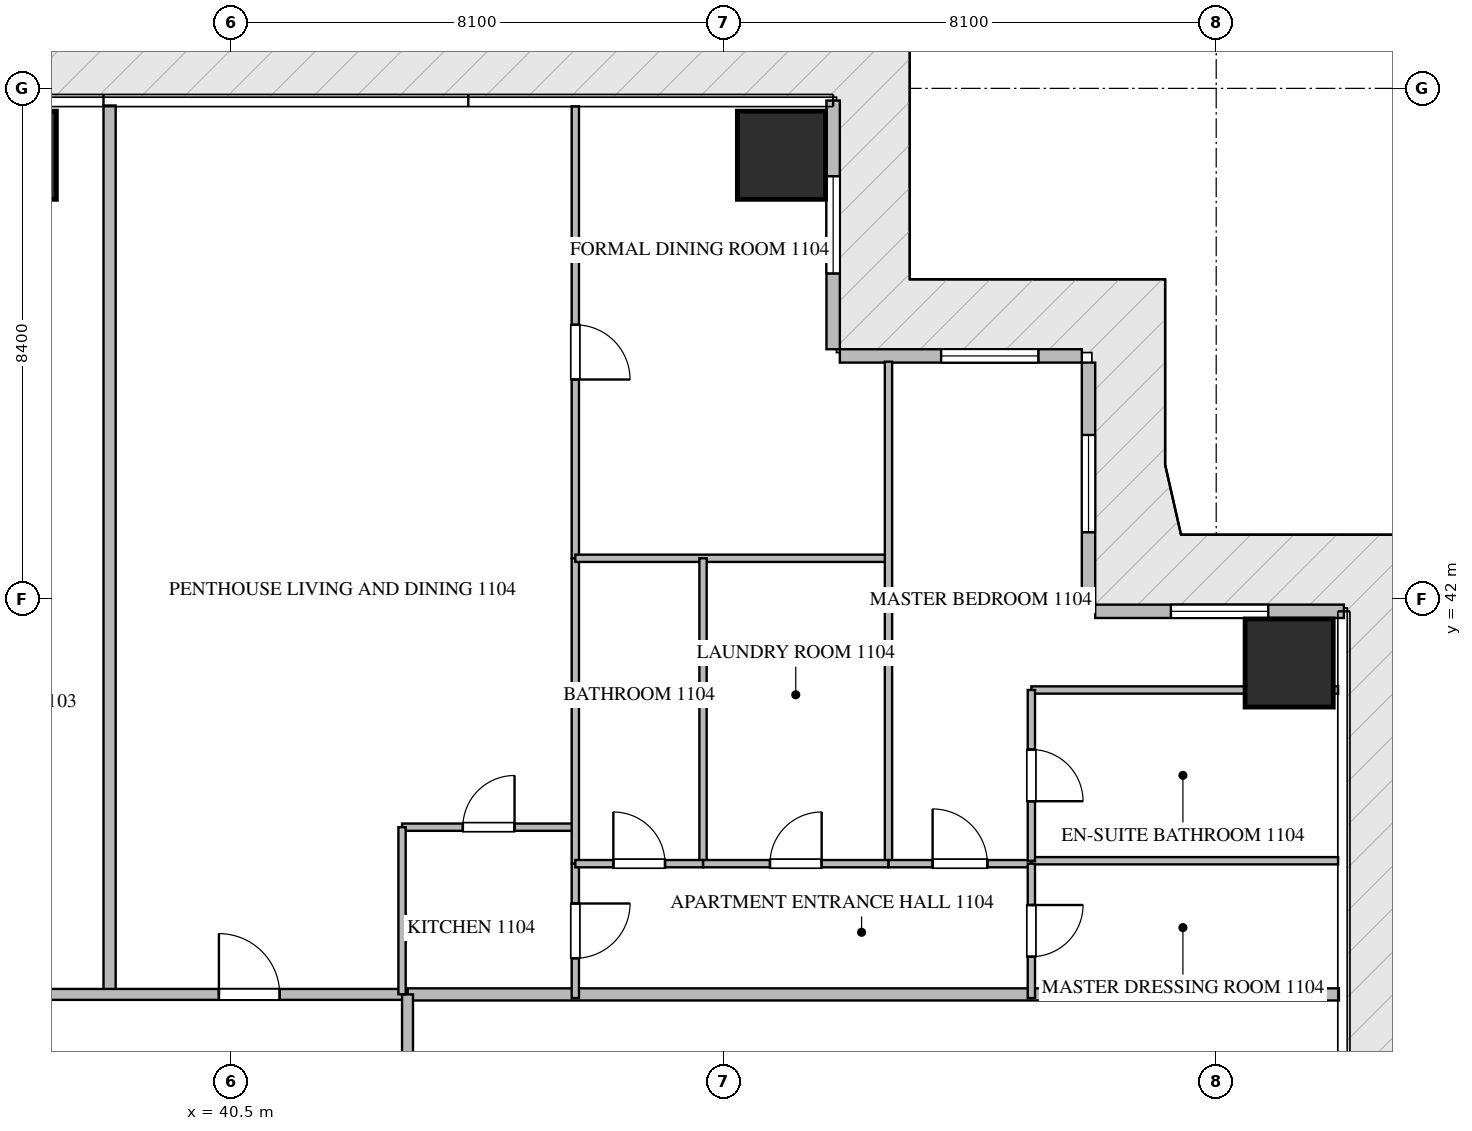
"""IFC4 building model, lengths in metres.
Left out: names, types, materials, properties, quantities, classifications, styles, units other than length and angle.
Written with IfcOpenShell. Run it as: python <this file> out.ifc"""

import sys

from ifc_helpers import new_model, si_unit, direction, frame, frame_2d, origin, origin_2d, place, context, subcontext, project, spatial, rectangle, extrude, source, transform, mapped, element, fill, save


model = new_model("IFC4")
c1 = context("Model", 3, precision=1e-05, world=origin(), true_north=direction((0.0, 1.0)))
c2 = subcontext(c1, "Body", "Model", "MODEL_VIEW")
j1 = project(units=[si_unit("LENGTHUNIT", "METRE"), si_unit("PLANEANGLEUNIT", "RADIAN")], contexts=[c1])
p1 = place(None, origin())
s1 = spatial("IfcSite", under=j1, at=p1, CompositionType="ELEMENT")
p2 = place(p1, origin())
s2 = spatial("IfcBuilding", under=s1, at=p2, CompositionType="ELEMENT")
p3 = place(p2, frame((0.0, 0.0, 49.2)))
s3 = spatial("IfcBuildingStorey", under=s2, at=p3, CompositionType="ELEMENT", Elevation=49.2)
m1 = source(origin(), c2, "Body", "SweptSolid", [
    extrude(rectangle(XDim=1.45, YDim=1.45, at=origin_2d()), origin(), (0.0, 0.0, 1.0), 3.75),
])
for number, where, z_axis, x_axis in (
    (1, (36.9, 49.3, -0.26), (0.0, 0.0, 1.0), (1.0, 0.0, 0.0)),
    (2, (49.55, 49.3, -0.26), (0.0, 0.0, 1.0), (1.0, 0.0, 0.0)),
    (3, (57.9, 40.95, -0.26), (0.0, 0.0, 1.0), (1.0, 0.0, 0.0)),
):
    element("IfcColumn", number, at=place(p3, frame(where, z_axis=z_axis, x_axis=x_axis)), inside=s3, PredefinedType="COLUMN", context=c2, shape_type="MappedRepresentation", body=[
        mapped(m1, transform((0.0, 0.0, 0.0), scale=1.0)),
    ])
p4 = place(p3, frame((58.8, 41.8, 0.0), z_axis=(0.0, 0.0, 1.0), x_axis=(-1.0, 0.0, 0.0)))
e4 = element("IfcWall", 4, at=p4, inside=s3, PredefinedType="ELEMENTEDWALL", context=c2, shape_type="SweptSolid", body=[
    extrude(rectangle(XDim=4.09, YDim=0.22, at=frame_2d((2.045, 0.0))), origin(), (0.0, 0.0, 1.0), 3.475),
])
p5 = place(p4, frame((1.245, 0.0, 0.65)))
e5 = element("IfcOpeningElement", 5, at=p5, cuts=e4, PredefinedType="OPENING", context=c2, shape_type="SweptSolid", body=[
    extrude(rectangle(XDim=1.6, YDim=2.1, at=frame_2d((0.8, 1.05))), frame((0.0, 0.12, 0.0), z_axis=(0.0, -1.0, 0.0), x_axis=(1.0, 0.0, 0.0)), (0.0, 0.0, 1.0), 0.24),
])
p6 = place(p3, frame((54.6, 41.91, 0.0), z_axis=(0.0, 0.0, 1.0), x_axis=(0.0, 1.0, 0.0)))
e6 = element("IfcWall", 6, at=p6, inside=s3, PredefinedType="ELEMENTEDWALL", context=c2, shape_type="SweptSolid", body=[
    extrude(rectangle(XDim=3.98, YDim=0.22, at=frame_2d((1.99, 0.0))), origin(), (0.0, 0.0, 1.0), 3.475),
])
p7 = place(p6, frame((1.19, 0.0, 0.65)))
e7 = element("IfcOpeningElement", 7, at=p7, cuts=e6, PredefinedType="OPENING", context=c2, shape_type="SweptSolid", body=[
    extrude(rectangle(XDim=1.6, YDim=2.1, at=frame_2d((0.8, 1.05))), frame((0.0, 0.12, 0.0), z_axis=(0.0, -1.0, 0.0), x_axis=(1.0, 0.0, 0.0)), (0.0, 0.0, 1.0), 0.24),
])
p8 = place(p3, frame((54.49, 46.0, 0.0), z_axis=(0.0, 0.0, 1.0), x_axis=(-1.0, 0.0, 0.0)))
e8 = element("IfcWall", 8, at=p8, inside=s3, PredefinedType="ELEMENTEDWALL", context=c2, shape_type="SweptSolid", body=[
    extrude(rectangle(XDim=3.98, YDim=0.22, at=frame_2d((1.99, 0.0))), origin(), (0.0, 0.0, 1.0), 3.475),
])
p9 = place(p8, frame((0.714, 0.0, 0.65)))
e9 = element("IfcOpeningElement", 9, at=p9, cuts=e8, PredefinedType="OPENING", context=c2, shape_type="SweptSolid", body=[
    extrude(rectangle(XDim=1.6, YDim=2.1, at=frame_2d((0.8, 1.05))), frame((0.0, 0.12, 0.0), z_axis=(0.0, -1.0, 0.0), x_axis=(1.0, 0.0, 0.0)), (0.0, 0.0, 1.0), 0.24),
])
p10 = place(p3, frame((50.4, 46.11, 0.0), z_axis=(0.0, 0.0, 1.0), x_axis=(0.0, 1.0, 0.0)))
e10 = element("IfcWall", 10, at=p10, inside=s3, PredefinedType="ELEMENTEDWALL", context=c2, shape_type="SweptSolid", body=[
    extrude(rectangle(XDim=4.09, YDim=0.22, at=frame_2d((2.045, 0.0))), origin(), (0.0, 0.0, 1.0), 3.475),
])
p11 = place(p10, frame((1.245, 0.0, 0.65)))
e11 = element("IfcOpeningElement", 11, at=p11, cuts=e10, PredefinedType="OPENING", context=c2, shape_type="SweptSolid", body=[
    extrude(rectangle(XDim=1.6, YDim=2.1, at=frame_2d((0.8, 1.05))), frame((0.0, 0.12, 0.0), z_axis=(0.0, -1.0, 0.0), x_axis=(1.0, 0.0, 0.0)), (0.0, 0.0, 1.0), 0.24),
])
p12 = place(p3, frame((38.5, 35.5, 0.0), z_axis=(0.0, 0.0, 1.0), x_axis=(0.0, 1.0, 0.0)))
e12 = element("IfcWall", 12, at=p12, inside=s3, PredefinedType="PARTITIONING", context=c2, shape_type="SweptSolid", body=[
    extrude(rectangle(XDim=14.618, YDim=0.2, at=frame_2d((7.309, 0.0))), origin(), (0.0, 0.0, 1.0), 3.49),
])
p13 = place(p3, frame((43.4, 35.5, 0.0), z_axis=(0.0, 0.0, 1.0), x_axis=(1.0, 0.0, 0.0)))
e13 = element("IfcWall", 13, at=p13, inside=s3, PredefinedType="PARTITIONING", context=c2, shape_type="SweptSolid", body=[
    extrude(rectangle(XDim=15.318, YDim=0.2, at=frame_2d((7.659, 0.0))), origin(), (0.0, 0.0, 1.0), 3.49),
])
p14 = place(p3, frame((21.402, 35.5, 0.0), z_axis=(0.0, 0.0, 1.0), x_axis=(1.0, 0.0, 0.0)))
e14 = element("IfcWall", 14, at=p14, inside=s3, PredefinedType="PARTITIONING", context=c2, shape_type="SweptSolid", body=[
    extrude(rectangle(XDim=21.996, YDim=0.18, at=frame_2d((10.998, 0.0))), origin(), (0.0, 0.0, 1.0), 3.49),
])
p15 = place(p14, frame((2.1, 0.0, 0.0)))
e15 = element("IfcOpeningElement", 15, at=p15, cuts=e14, PredefinedType="OPENING", context=c2, shape_type="SweptSolid", body=[
    extrude(rectangle(XDim=1.0, YDim=2.15, at=frame_2d((0.5, 1.075))), frame((0.0, 0.1, 0.0), z_axis=(0.0, -1.0, 0.0), x_axis=(1.0, 0.0, 0.0)), (0.0, 0.0, 1.0), 0.2),
])
p16 = place(p14, frame((14.214, 0.0, 0.0)))
e16 = element("IfcOpeningElement", 16, at=p16, cuts=e14, PredefinedType="OPENING", context=c2, shape_type="SweptSolid", body=[
    extrude(rectangle(XDim=1.0, YDim=2.15, at=frame_2d((0.5, 1.075))), frame((0.0, 0.1, 0.0), z_axis=(0.0, -1.0, 0.0), x_axis=(1.0, 0.0, 0.0)), (0.0, 0.0, 1.0), 0.2),
])
p17 = place(p14, frame((18.896, 0.0, 0.0)))
e17 = element("IfcOpeningElement", 17, at=p17, cuts=e14, PredefinedType="OPENING", context=c2, shape_type="SweptSolid", body=[
    extrude(rectangle(XDim=1.0, YDim=2.15, at=frame_2d((0.5, 1.075))), frame((0.0, 0.1, 0.0), z_axis=(0.0, -1.0, 0.0), x_axis=(1.0, 0.0, 0.0)), (0.0, 0.0, 1.0), 0.2),
])
p18 = place(p3, frame((43.4, 14.9, 0.0), z_axis=(0.0, 0.0, 1.0), x_axis=(0.0, 1.0, 0.0)))
e18 = element("IfcWall", 18, at=p18, inside=s3, PredefinedType="PARTITIONING", context=c2, shape_type="SweptSolid", body=[
    extrude(rectangle(XDim=20.6, YDim=0.18, at=frame_2d((10.3, 0.0))), origin(), (0.0, 0.0, 1.0), 3.49),
])
p19 = place(p18, frame((17.64, 0.0, 0.0)))
e19 = element("IfcOpeningElement", 19, at=p19, cuts=e18, PredefinedType="OPENING", context=c2, shape_type="SweptSolid", body=[
    extrude(rectangle(XDim=1.0, YDim=2.15, at=frame_2d((0.5, 1.075))), frame((0.0, 0.1, 0.0), z_axis=(0.0, -1.0, 0.0), x_axis=(1.0, 0.0, 0.0)), (0.0, 0.0, 1.0), 0.2),
])
p20 = place(p3, frame((43.31, 38.25, 0.0), z_axis=(0.0, 0.0, 1.0), x_axis=(1.0, 0.0, 0.0)))
e20 = element("IfcWall", 20, at=p20, inside=s3, PredefinedType="PARTITIONING", context=c2, shape_type="SweptSolid", body=[
    extrude(rectangle(XDim=2.85, YDim=0.12, at=frame_2d((1.425, 0.0))), origin(), (0.0, 0.0, 1.0), 3.49),
])
p21 = place(p20, frame((1.0, 0.0, 0.0)))
e21 = element("IfcOpeningElement", 21, at=p21, cuts=e20, PredefinedType="OPENING", context=c2, shape_type="SweptSolid", body=[
    extrude(rectangle(XDim=0.85, YDim=2.1, at=frame_2d((0.425, 1.05))), frame((0.0, 0.07, 0.0), z_axis=(0.0, -1.0, 0.0), x_axis=(1.0, 0.0, 0.0)), (0.0, 0.0, 1.0), 0.14),
])
p22 = place(p3, frame((43.31, 38.25, 0.0), z_axis=(0.0, 0.0, 1.0), x_axis=(0.0, -1.0, 0.0)))
e22 = element("IfcWall", 22, at=p22, inside=s3, PredefinedType="PARTITIONING", context=c2, shape_type="SweptSolid", body=[
    extrude(rectangle(XDim=2.748, YDim=0.12, at=frame_2d((1.374, 0.0))), origin(), (0.0, 0.0, 1.0), 3.49),
])
p23 = place(p3, frame((46.16, 37.65, 0.0), z_axis=(0.0, 0.0, 1.0), x_axis=(0.0, -1.0, 0.0)))
e23 = element("IfcWall", 23, at=p23, inside=s3, PredefinedType="PARTITIONING", context=c2, shape_type="SweptSolid", body=[
    extrude(rectangle(XDim=2.21, YDim=0.12, at=frame_2d((1.105, 0.0))), origin(), (0.0, 0.0, 1.0), 3.49),
])
p24 = place(p23, frame((0.655, 0.0, 0.0)))
e24 = element("IfcOpeningElement", 24, at=p24, cuts=e23, PredefinedType="OPENING", context=c2, shape_type="SweptSolid", body=[
    extrude(rectangle(XDim=0.9, YDim=2.1, at=frame_2d((0.45, 1.05))), frame((0.0, 0.07, 0.0), z_axis=(0.0, -1.0, 0.0), x_axis=(1.0, 0.0, 0.0)), (0.0, 0.0, 1.0), 0.14),
])
p25 = place(p3, frame((46.16, 50.105, 0.0), z_axis=(0.0, 0.0, 1.0), x_axis=(0.0, -1.0, 0.0)))
e25 = element("IfcWall", 25, at=p25, inside=s3, PredefinedType="PARTITIONING", context=c2, shape_type="SweptSolid", body=[
    extrude(rectangle(XDim=7.433, YDim=0.12, at=frame_2d((3.716, 0.0))), origin(), (0.0, 0.0, 1.0), 3.49),
])
p26 = place(p25, frame((3.593, 0.0, 0.0)))
e26 = element("IfcOpeningElement", 26, at=p26, cuts=e25, PredefinedType="OPENING", context=c2, shape_type="SweptSolid", body=[
    extrude(rectangle(XDim=0.9, YDim=2.1, at=frame_2d((0.45, 1.05))), frame((0.0, 0.07, 0.0), z_axis=(0.0, -1.0, 0.0), x_axis=(1.0, 0.0, 0.0)), (0.0, 0.0, 1.0), 0.14),
])
p27 = place(p3, frame((46.16, 42.67, 0.0), z_axis=(0.0, 0.0, 1.0), x_axis=(0.0, -1.0, 0.0)))
e27 = element("IfcWall", 27, at=p27, inside=s3, PredefinedType="PARTITIONING", context=c2, shape_type="SweptSolid", body=[
    extrude(rectangle(XDim=5.018, YDim=0.12, at=frame_2d((2.509, 0.0))), origin(), (0.0, 0.0, 1.0), 3.49),
])
p28 = place(p3, frame((46.16, 42.672, 0.0), z_axis=(0.0, 0.0, 1.0), x_axis=(1.0, 0.0, 0.0)))
e28 = element("IfcWall", 28, at=p28, inside=s3, PredefinedType="PARTITIONING", context=c2, shape_type="SweptSolid", body=[
    extrude(rectangle(XDim=5.15, YDim=0.12, at=frame_2d((2.575, 0.0))), origin(), (0.0, 0.0, 1.0), 3.49),
])
p29 = place(p3, frame((51.31, 45.905, 0.0), z_axis=(0.0, 0.0, 1.0), x_axis=(0.0, -1.0, 0.0)))
e29 = element("IfcWall", 29, at=p29, inside=s3, PredefinedType="PARTITIONING", context=c2, shape_type="SweptSolid", body=[
    extrude(rectangle(XDim=8.255, YDim=0.12, at=frame_2d((4.127, 0.0))), origin(), (0.0, 0.0, 1.0), 3.49),
])
p30 = place(p3, frame((48.26, 42.672, 0.0), z_axis=(0.0, 0.0, 1.0), x_axis=(0.0, -1.0, 0.0)))
e30 = element("IfcWall", 30, at=p30, inside=s3, PredefinedType="PARTITIONING", context=c2, shape_type="SweptSolid", body=[
    extrude(rectangle(XDim=5.022, YDim=0.12, at=frame_2d((2.511, 0.0))), origin(), (0.0, 0.0, 1.0), 3.49),
])
p31 = place(p3, frame((46.16, 37.65, 0.0), z_axis=(0.0, 0.0, 1.0), x_axis=(1.0, 0.0, 0.0)))
e31 = element("IfcWall", 31, at=p31, inside=s3, PredefinedType="PARTITIONING", context=c2, shape_type="SweptSolid", body=[
    extrude(rectangle(XDim=2.1, YDim=0.12, at=frame_2d((1.05, 0.0))), origin(), (0.0, 0.0, 1.0), 3.49),
])
p32 = place(p31, frame((0.625, 0.0, 0.0)))
e32 = element("IfcOpeningElement", 32, at=p32, cuts=e31, PredefinedType="OPENING", context=c2, shape_type="SweptSolid", body=[
    extrude(rectangle(XDim=0.85, YDim=2.1, at=frame_2d((0.425, 1.05))), frame((0.0, 0.07, 0.0), z_axis=(0.0, -1.0, 0.0), x_axis=(1.0, 0.0, 0.0)), (0.0, 0.0, 1.0), 0.14),
])
p33 = place(p3, frame((48.262, 37.65, 0.0), z_axis=(0.0, 0.0, 1.0), x_axis=(1.0, 0.0, 0.0)))
e33 = element("IfcWall", 33, at=p33, inside=s3, PredefinedType="PARTITIONING", context=c2, shape_type="SweptSolid", body=[
    extrude(rectangle(XDim=3.048, YDim=0.12, at=frame_2d((1.524, 0.0))), origin(), (0.0, 0.0, 1.0), 3.49),
])
p34 = place(p33, frame((1.099, 0.0, 0.0)))
e34 = element("IfcOpeningElement", 34, at=p34, cuts=e33, PredefinedType="OPENING", context=c2, shape_type="SweptSolid", body=[
    extrude(rectangle(XDim=0.85, YDim=2.1, at=frame_2d((0.425, 1.05))), frame((0.0, 0.07, 0.0), z_axis=(0.0, -1.0, 0.0), x_axis=(1.0, 0.0, 0.0)), (0.0, 0.0, 1.0), 0.14),
])
p35 = place(p3, frame((51.312, 37.65, 0.0), z_axis=(0.0, 0.0, 1.0), x_axis=(1.0, 0.0, 0.0)))
e35 = element("IfcWall", 35, at=p35, inside=s3, PredefinedType="PARTITIONING", context=c2, shape_type="SweptSolid", body=[
    extrude(rectangle(XDim=2.348, YDim=0.12, at=frame_2d((1.174, 0.0))), origin(), (0.0, 0.0, 1.0), 3.49),
])
p36 = place(p35, frame((0.724, 0.0, 0.0)))
e36 = element("IfcOpeningElement", 36, at=p36, cuts=e35, PredefinedType="OPENING", context=c2, shape_type="SweptSolid", body=[
    extrude(rectangle(XDim=0.9, YDim=2.1, at=frame_2d((0.45, 1.05))), frame((0.0, 0.07, 0.0), z_axis=(0.0, -1.0, 0.0), x_axis=(1.0, 0.0, 0.0)), (0.0, 0.0, 1.0), 0.14),
])
p37 = place(p3, frame((53.66, 40.506, 0.0), z_axis=(0.0, 0.0, 1.0), x_axis=(1.0, 0.0, 0.0)))
e37 = element("IfcWall", 37, at=p37, inside=s3, PredefinedType="PARTITIONING", context=c2, shape_type="SweptSolid", body=[
    extrude(rectangle(XDim=5.045, YDim=0.12, at=frame_2d((2.522, 0.0))), origin(), (0.0, 0.0, 1.0), 3.49),
])
p38 = place(p3, frame((53.662, 37.698, 0.0), z_axis=(0.0, 0.0, 1.0), x_axis=(1.0, 0.0, 0.0)))
e38 = element("IfcWall", 38, at=p38, inside=s3, PredefinedType="PARTITIONING", context=c2, shape_type="SweptSolid", body=[
    extrude(rectangle(XDim=5.043, YDim=0.12, at=frame_2d((2.521, 0.0))), origin(), (0.0, 0.0, 1.0), 3.49),
])
p39 = place(p3, frame((53.66, 40.506, 0.0), z_axis=(0.0, 0.0, 1.0), x_axis=(0.0, -1.0, 0.0)))
e39 = element("IfcWall", 39, at=p39, inside=s3, PredefinedType="PARTITIONING", context=c2, shape_type="SweptSolid", body=[
    extrude(rectangle(XDim=2.808, YDim=0.12, at=frame_2d((1.404, 0.0))), origin(), (0.0, 0.0, 1.0), 3.49),
])
p40 = place(p39, frame((0.979, 0.0, 0.0)))
e40 = element("IfcOpeningElement", 40, at=p40, cuts=e39, PredefinedType="OPENING", context=c2, shape_type="SweptSolid", body=[
    extrude(rectangle(XDim=0.85, YDim=2.1, at=frame_2d((0.425, 1.05))), frame((0.0, 0.07, 0.0), z_axis=(0.0, -1.0, 0.0), x_axis=(1.0, 0.0, 0.0)), (0.0, 0.0, 1.0), 0.14),
])
p41 = place(p3, frame((53.66, 37.65, 0.0), z_axis=(0.0, 0.0, 1.0), x_axis=(0.0, -1.0, 0.0)))
e41 = element("IfcWall", 41, at=p41, inside=s3, PredefinedType="PARTITIONING", context=c2, shape_type="SweptSolid", body=[
    extrude(rectangle(XDim=2.21, YDim=0.12, at=frame_2d((1.105, 0.0))), origin(), (0.0, 0.0, 1.0), 3.49),
])
p42 = place(p41, frame((0.68, 0.0, 0.0)))
e42 = element("IfcOpeningElement", 42, at=p42, cuts=e41, PredefinedType="OPENING", context=c2, shape_type="SweptSolid", body=[
    extrude(rectangle(XDim=0.85, YDim=2.1, at=frame_2d((0.425, 1.05))), frame((0.0, 0.07, 0.0), z_axis=(0.0, -1.0, 0.0), x_axis=(1.0, 0.0, 0.0)), (0.0, 0.0, 1.0), 0.14),
])
m2 = source(origin(), c2, "Body", "SweptSolid", [
    extrude(rectangle(XDim=1.6, YDim=2.1, at=frame_2d((0.8, 1.05))), frame((0.0, 0.03, 0.0), z_axis=(0.0, -1.0, 0.0), x_axis=(1.0, 0.0, 0.0)), (0.0, 0.0, 1.0), 0.06),
])
p43 = place(p5, origin())
e43 = element("IfcWindow", 43, at=p43, inside=s3, PartitioningType="SINGLE_PANEL", PredefinedType="WINDOW", context=c2, shape_type="MappedRepresentation", body=[
    mapped(m2, transform((0.0, 0.0, 0.0), scale=1.0)),
])
fill(e5, e43)
p44 = place(p7, origin())
e44 = element("IfcWindow", 44, at=p44, inside=s3, PartitioningType="SINGLE_PANEL", PredefinedType="WINDOW", context=c2, shape_type="MappedRepresentation", body=[
    mapped(m2, transform((0.0, 0.0, 0.0), scale=1.0)),
])
fill(e7, e44)
p45 = place(p9, origin())
e45 = element("IfcWindow", 45, at=p45, inside=s3, PartitioningType="SINGLE_PANEL", PredefinedType="WINDOW", context=c2, shape_type="MappedRepresentation", body=[
    mapped(m2, transform((0.0, 0.0, 0.0), scale=1.0)),
])
fill(e9, e45)
p46 = place(p11, origin())
e46 = element("IfcWindow", 46, at=p46, inside=s3, PartitioningType="SINGLE_PANEL", PredefinedType="WINDOW", context=c2, shape_type="MappedRepresentation", body=[
    mapped(m2, transform((0.0, 0.0, 0.0), scale=1.0)),
])
fill(e11, e46)
m3 = source(origin(), c2, "Body", "SweptSolid", [
    extrude(rectangle(XDim=1.0, YDim=2.15, at=frame_2d((0.5, 1.075))), frame((0.0, 0.025, 0.0), z_axis=(0.0, -1.0, 0.0), x_axis=(1.0, 0.0, 0.0)), (0.0, 0.0, 1.0), 0.05),
])
p47 = place(p17, origin())
e47 = element("IfcDoor", 47, at=p47, inside=s3, OperationType="SINGLE_SWING_LEFT", PredefinedType="DOOR", context=c2, shape_type="MappedRepresentation", body=[
    mapped(m3, transform((0.0, 0.0, 0.0), scale=1.0)),
])
fill(e17, e47)
m4 = source(origin(), c2, "Body", "SweptSolid", [
    extrude(rectangle(XDim=0.85, YDim=2.1, at=frame_2d((0.425, 1.05))), frame((0.0, 0.025, 0.0), z_axis=(0.0, -1.0, 0.0), x_axis=(1.0, 0.0, 0.0)), (0.0, 0.0, 1.0), 0.05),
])
p48 = place(p21, origin())
e48 = element("IfcDoor", 48, at=p48, inside=s3, OperationType="SINGLE_SWING_RIGHT", PredefinedType="DOOR", context=c2, shape_type="MappedRepresentation", body=[
    mapped(m4, transform((0.0, 0.0, 0.0), scale=1.0)),
])
fill(e21, e48)
m5 = source(origin(), c2, "Body", "SweptSolid", [
    extrude(rectangle(XDim=0.9, YDim=2.1, at=frame_2d((0.45, 1.05))), frame((0.0, 0.025, 0.0), z_axis=(0.0, -1.0, 0.0), x_axis=(1.0, 0.0, 0.0)), (0.0, 0.0, 1.0), 0.05),
])
p49 = place(p24, origin())
e49 = element("IfcDoor", 49, at=p49, inside=s3, OperationType="SINGLE_SWING_LEFT", PredefinedType="DOOR", context=c2, shape_type="MappedRepresentation", body=[
    mapped(m5, transform((0.0, 0.0, 0.0), scale=1.0)),
])
fill(e24, e49)
p50 = place(p26, origin())
e50 = element("IfcDoor", 50, at=p50, inside=s3, OperationType="SINGLE_SWING_RIGHT", PredefinedType="DOOR", context=c2, shape_type="MappedRepresentation", body=[
    mapped(m5, transform((0.0, 0.0, 0.0), scale=1.0)),
])
fill(e26, e50)
p51 = place(p32, origin())
e51 = element("IfcDoor", 51, at=p51, inside=s3, OperationType="SINGLE_SWING_LEFT", PredefinedType="DOOR", context=c2, shape_type="MappedRepresentation", body=[
    mapped(m4, transform((0.0, 0.0, 0.0), scale=1.0)),
])
fill(e32, e51)
p52 = place(p34, origin())
e52 = element("IfcDoor", 52, at=p52, inside=s3, OperationType="SINGLE_SWING_RIGHT", PredefinedType="DOOR", context=c2, shape_type="MappedRepresentation", body=[
    mapped(m4, transform((0.0, 0.0, 0.0), scale=1.0)),
])
fill(e34, e52)
p53 = place(p36, origin())
e53 = element("IfcDoor", 53, at=p53, inside=s3, OperationType="SINGLE_SWING_LEFT", PredefinedType="DOOR", context=c2, shape_type="MappedRepresentation", body=[
    mapped(m5, transform((0.0, 0.0, 0.0), scale=1.0)),
])
fill(e36, e53)
p54 = place(p40, origin())
e54 = element("IfcDoor", 54, at=p54, inside=s3, OperationType="SINGLE_SWING_RIGHT", PredefinedType="DOOR", context=c2, shape_type="MappedRepresentation", body=[
    mapped(m4, transform((0.0, 0.0, 0.0), scale=1.0)),
])
fill(e40, e54)
p55 = place(p42, origin())
e55 = element("IfcDoor", 55, at=p55, inside=s3, OperationType="SINGLE_SWING_LEFT", PredefinedType="DOOR", context=c2, shape_type="MappedRepresentation", body=[
    mapped(m4, transform((0.0, 0.0, 0.0), scale=1.0)),
])
fill(e42, e55)
save(model, sys.argv[1])
